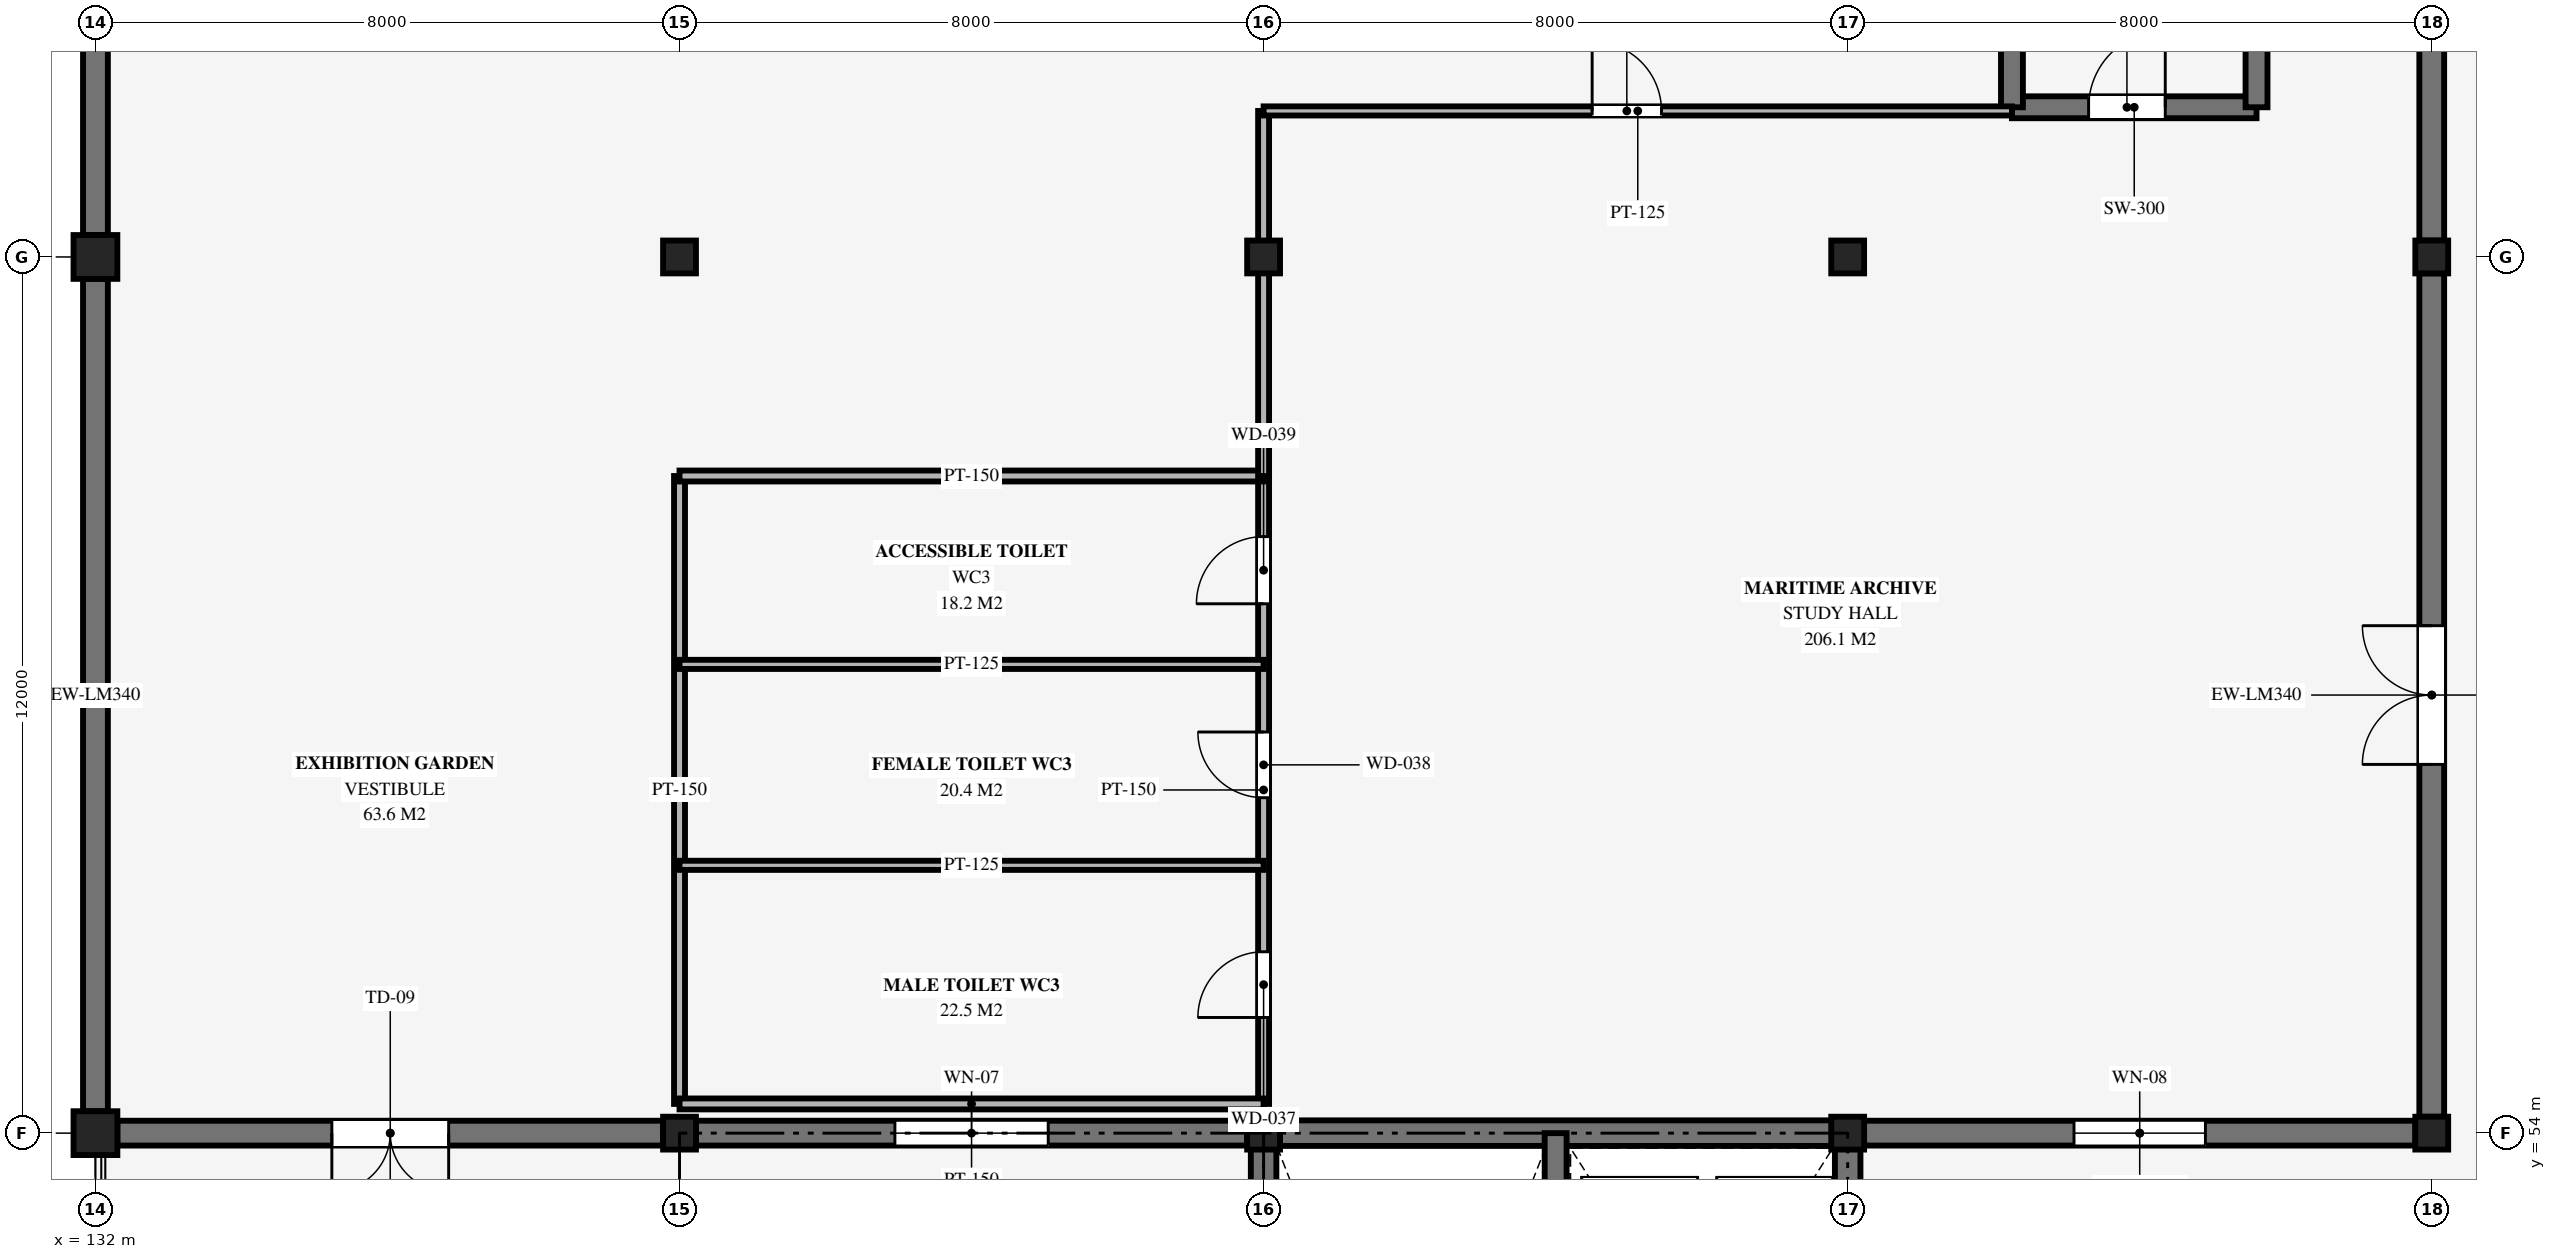
"""IFC4 building model, lengths in metres.
Left out: names, types, materials, properties, quantities, classifications, styles, units other than length and angle.
Written with IfcOpenShell. Run it as: python <this file> out.ifc"""

import sys

from ifc_helpers import new_model, si_unit, direction, frame, frame_2d, origin, origin_2d, place, context, subcontext, project, spatial, rectangle, circle, extrude, element, fill, save


model = new_model("IFC4")
c1 = context("Model", 3, precision=1e-05, world=origin(), true_north=direction((0.0, 1.0)))
c2 = subcontext(c1, "Body", "Model", "MODEL_VIEW")
j1 = project(units=[si_unit("LENGTHUNIT", "METRE"), si_unit("PLANEANGLEUNIT", "RADIAN")], contexts=[c1])
p1 = place(None, origin())
s1 = spatial("IfcSite", under=j1, at=p1, CompositionType="ELEMENT")
p2 = place(p1, origin())
s2 = spatial("IfcBuilding", under=s1, at=p2, CompositionType="ELEMENT")
p3 = place(p2, frame((0.0, 0.0, 15.0)))
s3 = spatial("IfcBuildingStorey", under=s2, at=p3, CompositionType="ELEMENT", Elevation=15.0)
for number, where, z_axis, x_axis in (
    (1, (132.0, 54.0, 0.0), (0.0, 0.0, 1.0), (1.0, 0.0, 0.0)),
    (2, (132.0, 66.0, 0.0), (0.0, 0.0, 1.0), (1.0, 0.0, 0.0)),
):
    element("IfcColumn", number, at=place(p3, frame(where, z_axis=z_axis, x_axis=x_axis)), inside=s3, PredefinedType="COLUMN", context=c2, shape_type="SweptSolid", body=[
        extrude(circle(Radius=0.3, at=origin_2d()), origin(), (0.0, 0.0, 1.0), 4.34),
    ])
for number, where, z_axis, x_axis in (
    (3, (140.0, 54.0, 0.0), (0.0, 0.0, 1.0), (1.0, 0.0, 0.0)),
    (4, (140.0, 66.0, 0.0), (0.0, 0.0, 1.0), (1.0, 0.0, 0.0)),
    (5, (148.0, 54.0, 0.0), (0.0, 0.0, 1.0), (1.0, 0.0, 0.0)),
    (6, (148.0, 66.0, 0.0), (0.0, 0.0, 1.0), (1.0, 0.0, 0.0)),
    (7, (156.0, 54.0, 0.0), (0.0, 0.0, 1.0), (1.0, 0.0, 0.0)),
    (8, (156.0, 66.0, 0.0), (0.0, 0.0, 1.0), (1.0, 0.0, 0.0)),
    (9, (164.0, 54.0, 0.0), (0.0, 0.0, 1.0), (1.0, 0.0, 0.0)),
    (10, (164.0, 66.0, 0.0), (0.0, 0.0, 1.0), (1.0, 0.0, 0.0)),
):
    element("IfcColumn", number, at=place(p3, frame(where, z_axis=z_axis, x_axis=x_axis)), inside=s3, PredefinedType="COLUMN", context=c2, shape_type="SweptSolid", body=[
        extrude(rectangle(XDim=0.45, YDim=0.45, at=origin_2d()), origin(), (0.0, 0.0, 1.0), 4.34),
    ])
p4 = place(p3, frame((132.0, 65.7, 0.0), z_axis=(0.0, 0.0, 1.0), x_axis=(0.0, -1.0, 0.0)))
e11 = element("IfcWall", 11, at=p4, inside=s3, PredefinedType="SOLIDWALL", context=c2, shape_type="SweptSolid", body=[
    extrude(rectangle(XDim=11.4, YDim=0.34, at=frame_2d((5.7, 0.0))), origin(), (0.0, 0.0, 1.0), 4.24),
])
p5 = place(p3, frame((164.0, 54.225, 0.0), z_axis=(0.0, 0.0, 1.0), x_axis=(0.0, 1.0, 0.0)))
e12 = element("IfcWall", 12, at=p5, inside=s3, PredefinedType="SOLIDWALL", context=c2, shape_type="SweptSolid", body=[
    extrude(rectangle(XDim=11.55, YDim=0.34, at=frame_2d((5.775, 0.0))), origin(), (0.0, 0.0, 1.0), 4.24),
])
p6 = place(p5, frame((4.825, 0.0, 0.0)))
e13 = element("IfcOpeningElement", 13, at=p6, cuts=e12, PredefinedType="OPENING", context=c2, shape_type="SweptSolid", body=[
    extrude(rectangle(XDim=1.9, YDim=2.2, at=frame_2d((0.95, 1.1))), frame((0.0, 0.18, 0.0), z_axis=(0.0, -1.0, 0.0), x_axis=(1.0, 0.0, 0.0)), (0.0, 0.0, 1.0), 0.36),
])
p7 = place(p3, frame((132.0, 77.7, 0.0), z_axis=(0.0, 0.0, 1.0), x_axis=(0.0, -1.0, 0.0)))
e14 = element("IfcWall", 14, at=p7, inside=s3, PredefinedType="SOLIDWALL", context=c2, shape_type="SweptSolid", body=[
    extrude(rectangle(XDim=11.4, YDim=0.34, at=frame_2d((5.7, 0.0))), origin(), (0.0, 0.0, 1.0), 4.24),
])
p8 = place(p7, frame((4.95, 0.0, 1.0)))
e15 = element("IfcOpeningElement", 15, at=p8, cuts=e14, PredefinedType="OPENING", context=c2, shape_type="SweptSolid", body=[
    extrude(rectangle(XDim=1.5, YDim=2.2, at=frame_2d((0.75, 1.1))), frame((0.0, 0.18, 0.0), z_axis=(0.0, -1.0, 0.0), x_axis=(1.0, 0.0, 0.0)), (0.0, 0.0, 1.0), 0.36),
])
p9 = place(p3, frame((164.0, 66.225, 0.0), z_axis=(0.0, 0.0, 1.0), x_axis=(0.0, 1.0, 0.0)))
e16 = element("IfcWall", 16, at=p9, inside=s3, PredefinedType="SOLIDWALL", context=c2, shape_type="SweptSolid", body=[
    extrude(rectangle(XDim=11.55, YDim=0.34, at=frame_2d((5.775, 0.0))), origin(), (0.0, 0.0, 1.0), 4.24),
])
p10 = place(p9, frame((5.175, 0.0, 1.0)))
e17 = element("IfcOpeningElement", 17, at=p10, cuts=e16, PredefinedType="OPENING", context=c2, shape_type="SweptSolid", body=[
    extrude(rectangle(XDim=1.2, YDim=2.2, at=frame_2d((0.6, 1.1))), frame((0.0, 0.18, 0.0), z_axis=(0.0, -1.0, 0.0), x_axis=(1.0, 0.0, 0.0)), (0.0, 0.0, 1.0), 0.36),
])
p11 = place(p3, frame((139.775, 54.0, 0.0), z_axis=(0.0, 0.0, 1.0), x_axis=(-1.0, 0.0, 0.0)))
e18 = element("IfcWall", 18, at=p11, inside=s3, PredefinedType="SOLIDWALL", context=c2, shape_type="SweptSolid", body=[
    extrude(rectangle(XDim=7.475, YDim=0.34, at=frame_2d((3.737, 0.0))), origin(), (0.0, 0.0, 1.0), 4.24),
])
p12 = place(p11, frame((2.937, 0.0, 0.0)))
e19 = element("IfcOpeningElement", 19, at=p12, cuts=e18, PredefinedType="OPENING", context=c2, shape_type="SweptSolid", body=[
    extrude(rectangle(XDim=1.6, YDim=2.2, at=frame_2d((0.8, 1.1))), frame((0.0, 0.18, 0.0), z_axis=(0.0, -1.0, 0.0), x_axis=(1.0, 0.0, 0.0)), (0.0, 0.0, 1.0), 0.36),
])
p13 = place(p3, frame((147.775, 54.0, 0.0), z_axis=(0.0, 0.0, 1.0), x_axis=(-1.0, 0.0, 0.0)))
e20 = element("IfcWall", 20, at=p13, inside=s3, PredefinedType="SOLIDWALL", context=c2, shape_type="SweptSolid", body=[
    extrude(rectangle(XDim=7.55, YDim=0.34, at=frame_2d((3.775, 0.0))), origin(), (0.0, 0.0, 1.0), 4.24),
])
p14 = place(p13, frame((2.725, 0.0, 1.0)))
e21 = element("IfcOpeningElement", 21, at=p14, cuts=e20, PredefinedType="OPENING", context=c2, shape_type="SweptSolid", body=[
    extrude(rectangle(XDim=2.1, YDim=1.8, at=frame_2d((1.05, 0.9))), frame((0.0, 0.18, 0.0), z_axis=(0.0, -1.0, 0.0), x_axis=(1.0, 0.0, 0.0)), (0.0, 0.0, 1.0), 0.36),
])
p15 = place(p3, frame((163.775, 54.0, 0.0), z_axis=(0.0, 0.0, 1.0), x_axis=(-1.0, 0.0, 0.0)))
e22 = element("IfcWall", 22, at=p15, inside=s3, PredefinedType="SOLIDWALL", context=c2, shape_type="SweptSolid", body=[
    extrude(rectangle(XDim=7.55, YDim=0.34, at=frame_2d((3.775, 0.0))), origin(), (0.0, 0.0, 1.0), 4.24),
])
p16 = place(p15, frame((2.875, 0.0, 1.0)))
e23 = element("IfcOpeningElement", 23, at=p16, cuts=e22, PredefinedType="OPENING", context=c2, shape_type="SweptSolid", body=[
    extrude(rectangle(XDim=1.8, YDim=1.8, at=frame_2d((0.9, 0.9))), frame((0.0, 0.18, 0.0), z_axis=(0.0, -1.0, 0.0), x_axis=(1.0, 0.0, 0.0)), (0.0, 0.0, 1.0), 0.36),
])
p17 = place(p3, frame((148.0, 54.0, 0.0), z_axis=(0.0, 0.0, 1.0), x_axis=(1.0, 0.0, 0.0)))
e24 = element("IfcWall", 24, at=p17, inside=s3, PredefinedType="SHEAR", context=c2, shape_type="SweptSolid", body=[
    extrude(rectangle(XDim=8.0, YDim=0.35, at=frame_2d((4.0, 0.0))), origin(), (0.0, 0.0, 1.0), 4.48),
])
p18 = place(p3, frame((148.0, 42.0, 0.0), z_axis=(0.0, 0.0, 1.0), x_axis=(0.0, 1.0, 0.0)))
e25 = element("IfcWall", 25, at=p18, inside=s3, PredefinedType="SHEAR", context=c2, shape_type="SweptSolid", body=[
    extrude(rectangle(XDim=12.0, YDim=0.35, at=frame_2d((6.0, 0.0))), origin(), (0.0, 0.0, 1.0), 4.48),
])
p19 = place(p3, frame((156.0, 42.0, 0.0), z_axis=(0.0, 0.0, 1.0), x_axis=(0.0, 1.0, 0.0)))
e26 = element("IfcWall", 26, at=p19, inside=s3, PredefinedType="SHEAR", context=c2, shape_type="SweptSolid", body=[
    extrude(rectangle(XDim=12.0, YDim=0.35, at=frame_2d((6.0, 0.0))), origin(), (0.0, 0.0, 1.0), 4.48),
])
p20 = place(p19, frame((1.4, 0.0, 0.0)))
e27 = element("IfcOpeningElement", 27, at=p20, cuts=e26, PredefinedType="OPENING", context=c2, shape_type="SweptSolid", body=[
    extrude(rectangle(XDim=1.5, YDim=2.2, at=frame_2d((0.75, 1.1))), frame((0.0, 0.185, 0.0), z_axis=(0.0, -1.0, 0.0), x_axis=(1.0, 0.0, 0.0)), (0.0, 0.0, 1.0), 0.37),
])
p21 = place(p3, frame((152.0, 54.0, 0.0), z_axis=(0.0, 0.0, 1.0), x_axis=(0.0, -1.0, 0.0)))
e28 = element("IfcWall", 28, at=p21, inside=s3, PredefinedType="SHEAR", context=c2, shape_type="SweptSolid", body=[
    extrude(rectangle(XDim=12.0, YDim=0.3, at=frame_2d((6.0, 0.0))), origin(), (0.0, 0.0, 1.0), 4.48),
])
p22 = place(p21, frame((10.45, 0.0, 0.0)))
e29 = element("IfcOpeningElement", 29, at=p22, cuts=e28, PredefinedType="OPENING", context=c2, shape_type="SweptSolid", body=[
    extrude(rectangle(XDim=1.05, YDim=2.15, at=frame_2d((0.525, 1.075))), frame((0.0, 0.16, 0.0), z_axis=(0.0, -1.0, 0.0), x_axis=(1.0, 0.0, 0.0)), (0.0, 0.0, 1.0), 0.32),
])
p23 = place(p3, frame((158.25, 68.05, 0.0), z_axis=(0.0, 0.0, 1.0), x_axis=(1.0, 0.0, 0.0)))
e30 = element("IfcWall", 30, at=p23, inside=s3, PredefinedType="SHEAR", context=c2, shape_type="SweptSolid", body=[
    extrude(rectangle(XDim=3.35, YDim=0.3, at=frame_2d((1.675, 0.0))), origin(), (0.0, 0.0, 1.0), 4.48),
])
p24 = place(p23, frame((1.05, 0.0, 0.0)))
e31 = element("IfcOpeningElement", 31, at=p24, cuts=e30, PredefinedType="OPENING", context=c2, shape_type="SweptSolid", body=[
    extrude(rectangle(XDim=1.05, YDim=2.15, at=frame_2d((0.525, 1.075))), frame((0.0, 0.16, 0.0), z_axis=(0.0, -1.0, 0.0), x_axis=(1.0, 0.0, 0.0)), (0.0, 0.0, 1.0), 0.32),
])
for number, where, z_axis, x_axis in (
    (32, (158.25, 68.05, 0.0), (0.0, 0.0, 1.0), (0.0, 1.0, 0.0)),
    (33, (161.6, 68.05, 0.0), (0.0, 0.0, 1.0), (0.0, 1.0, 0.0)),
):
    element("IfcWall", number, at=place(p3, frame(where, z_axis=z_axis, x_axis=x_axis)), inside=s3, PredefinedType="SHEAR", context=c2, shape_type="SweptSolid", body=[
        extrude(rectangle(XDim=9.0, YDim=0.3, at=frame_2d((4.5, 0.0))), origin(), (0.0, 0.0, 1.0), 4.48),
    ])
p25 = place(p3, frame((140.0, 54.4, 0.0), z_axis=(0.0, 0.0, 1.0), x_axis=(0.0, 1.0, 0.0)))
e34 = element("IfcWall", 34, at=p25, inside=s3, PredefinedType="PARTITIONING", context=c2, shape_type="SweptSolid", body=[
    extrude(rectangle(XDim=8.6, YDim=0.15, at=frame_2d((4.3, 0.0))), origin(), (0.0, 0.0, 1.0), 3.45),
])
p26 = place(p3, frame((148.0, 54.4, 0.0), z_axis=(0.0, 0.0, 1.0), x_axis=(0.0, 1.0, 0.0)))
e35 = element("IfcWall", 35, at=p26, inside=s3, PredefinedType="PARTITIONING", context=c2, shape_type="SweptSolid", body=[
    extrude(rectangle(XDim=8.6, YDim=0.15, at=frame_2d((4.3, 0.0))), origin(), (0.0, 0.0, 1.0), 3.45),
])
p27 = place(p26, frame((1.184, 0.0, 0.0)))
e36 = element("IfcOpeningElement", 36, at=p27, cuts=e35, PredefinedType="OPENING", context=c2, shape_type="SweptSolid", body=[
    extrude(rectangle(XDim=0.9, YDim=2.1, at=frame_2d((0.45, 1.05))), frame((0.0, 0.085, 0.0), z_axis=(0.0, -1.0, 0.0), x_axis=(1.0, 0.0, 0.0)), (0.0, 0.0, 1.0), 0.17),
])
p28 = place(p26, frame((4.194, 0.0, 0.0)))
e37 = element("IfcOpeningElement", 37, at=p28, cuts=e35, PredefinedType="OPENING", context=c2, shape_type="SweptSolid", body=[
    extrude(rectangle(XDim=0.9, YDim=2.1, at=frame_2d((0.45, 1.05))), frame((0.0, 0.085, 0.0), z_axis=(0.0, -1.0, 0.0), x_axis=(1.0, 0.0, 0.0)), (0.0, 0.0, 1.0), 0.17),
])
p29 = place(p26, frame((6.85, 0.0, 0.0)))
e38 = element("IfcOpeningElement", 38, at=p29, cuts=e35, PredefinedType="OPENING", context=c2, shape_type="SweptSolid", body=[
    extrude(rectangle(XDim=0.92, YDim=2.1, at=frame_2d((0.46, 1.05))), frame((0.0, 0.085, 0.0), z_axis=(0.0, -1.0, 0.0), x_axis=(1.0, 0.0, 0.0)), (0.0, 0.0, 1.0), 0.17),
])
for number, where, z_axis, x_axis in (
    (39, (140.0, 63.0, 0.0), (0.0, 0.0, 1.0), (1.0, 0.0, 0.0)),
    (40, (140.0, 54.4, 0.0), (0.0, 0.0, 1.0), (1.0, 0.0, 0.0)),
):
    element("IfcWall", number, at=place(p3, frame(where, z_axis=z_axis, x_axis=x_axis)), inside=s3, PredefinedType="PARTITIONING", context=c2, shape_type="SweptSolid", body=[
        extrude(rectangle(XDim=8.0, YDim=0.15, at=frame_2d((4.0, 0.0))), origin(), (0.0, 0.0, 1.0), 3.45),
    ])
for number, where, z_axis, x_axis in (
    (41, (140.0, 57.668, 0.0), (0.0, 0.0, 1.0), (1.0, 0.0, 0.0)),
    (42, (140.0, 60.42, 0.0), (0.0, 0.0, 1.0), (1.0, 0.0, 0.0)),
):
    element("IfcWall", number, at=place(p3, frame(where, z_axis=z_axis, x_axis=x_axis)), inside=s3, PredefinedType="PARTITIONING", context=c2, shape_type="SweptSolid", body=[
        extrude(rectangle(XDim=8.0, YDim=0.125, at=frame_2d((4.0, 0.0))), origin(), (0.0, 0.0, 1.0), 3.45),
    ])
p30 = place(p3, frame((148.0, 63.0, 0.0), z_axis=(0.0, 0.0, 1.0), x_axis=(0.0, 1.0, 0.0)))
e43 = element("IfcWall", 43, at=p30, inside=s3, PredefinedType="PARTITIONING", context=c2, shape_type="SweptSolid", body=[
    extrude(rectangle(XDim=5.0, YDim=0.15, at=frame_2d((2.5, 0.0))), origin(), (0.0, 0.0, 1.0), 3.45),
])
p31 = place(p3, frame((148.0, 68.0, 0.0), z_axis=(0.0, 0.0, 1.0), x_axis=(1.0, 0.0, 0.0)))
e44 = element("IfcWall", 44, at=p31, inside=s3, PredefinedType="PARTITIONING", context=c2, shape_type="SweptSolid", body=[
    extrude(rectangle(XDim=10.25, YDim=0.125, at=frame_2d((5.125, 0.0))), origin(), (0.0, 0.0, 1.0), 3.45),
])
p32 = place(p31, frame((4.5, 0.0, 0.0)))
e45 = element("IfcOpeningElement", 45, at=p32, cuts=e44, PredefinedType="OPENING", context=c2, shape_type="SweptSolid", body=[
    extrude(rectangle(XDim=0.95, YDim=2.1, at=frame_2d((0.475, 1.05))), frame((0.0, 0.073, 0.0), z_axis=(0.0, -1.0, 0.0), x_axis=(1.0, 0.0, 0.0)), (0.0, 0.0, 1.0), 0.145),
])
p33 = place(p6, origin())
e46 = element("IfcDoor", 46, at=p33, inside=s3, OperationType="DOUBLE_DOOR_SINGLE_SWING", PredefinedType="DOOR", context=c2, shape_type="SweptSolid", body=[
    extrude(rectangle(XDim=1.9, YDim=2.2, at=frame_2d((0.95, 1.1))), frame((0.0, 0.025, 0.0), z_axis=(0.0, -1.0, 0.0), x_axis=(1.0, 0.0, 0.0)), (0.0, 0.0, 1.0), 0.05),
])
fill(e13, e46)
p34 = place(p12, origin())
e47 = element("IfcDoor", 47, at=p34, inside=s3, OperationType="DOUBLE_DOOR_SINGLE_SWING", PredefinedType="DOOR", context=c2, shape_type="SweptSolid", body=[
    extrude(rectangle(XDim=1.6, YDim=2.2, at=frame_2d((0.8, 1.1))), frame((0.0, 0.025, 0.0), z_axis=(0.0, -1.0, 0.0), x_axis=(1.0, 0.0, 0.0)), (0.0, 0.0, 1.0), 0.05),
])
fill(e19, e47)
p35 = place(p14, origin())
e48 = element("IfcWindow", 48, at=p35, inside=s3, PartitioningType="SINGLE_PANEL", PredefinedType="WINDOW", context=c2, shape_type="SweptSolid", body=[
    extrude(rectangle(XDim=2.1, YDim=1.8, at=frame_2d((1.05, 0.9))), frame((0.0, 0.03, 0.0), z_axis=(0.0, -1.0, 0.0), x_axis=(1.0, 0.0, 0.0)), (0.0, 0.0, 1.0), 0.06),
])
fill(e21, e48)
p36 = place(p16, origin())
e49 = element("IfcWindow", 49, at=p36, inside=s3, PartitioningType="SINGLE_PANEL", PredefinedType="WINDOW", context=c2, shape_type="SweptSolid", body=[
    extrude(rectangle(XDim=1.8, YDim=1.8, at=frame_2d((0.9, 0.9))), frame((0.0, 0.03, 0.0), z_axis=(0.0, -1.0, 0.0), x_axis=(1.0, 0.0, 0.0)), (0.0, 0.0, 1.0), 0.06),
])
fill(e23, e49)
p37 = place(p24, origin())
e50 = element("IfcDoor", 50, at=p37, inside=s3, OperationType="SINGLE_SWING_RIGHT", PredefinedType="DOOR", context=c2, shape_type="SweptSolid", body=[
    extrude(rectangle(XDim=1.05, YDim=2.15, at=frame_2d((0.525, 1.075))), frame((0.0, 0.025, 0.0), z_axis=(0.0, -1.0, 0.0), x_axis=(1.0, 0.0, 0.0)), (0.0, 0.0, 1.0), 0.05),
])
fill(e31, e50)
p38 = place(p27, origin())
e51 = element("IfcDoor", 51, at=p38, inside=s3, OperationType="SINGLE_SWING_LEFT", PredefinedType="DOOR", context=c2, shape_type="SweptSolid", body=[
    extrude(rectangle(XDim=0.9, YDim=2.1, at=frame_2d((0.45, 1.05))), frame((0.0, 0.025, 0.0), z_axis=(0.0, -1.0, 0.0), x_axis=(1.0, 0.0, 0.0)), (0.0, 0.0, 1.0), 0.05),
])
fill(e36, e51)
p39 = place(p28, origin())
e52 = element("IfcDoor", 52, at=p39, inside=s3, OperationType="SINGLE_SWING_RIGHT", PredefinedType="DOOR", context=c2, shape_type="SweptSolid", body=[
    extrude(rectangle(XDim=0.9, YDim=2.1, at=frame_2d((0.45, 1.05))), frame((0.0, 0.025, 0.0), z_axis=(0.0, -1.0, 0.0), x_axis=(1.0, 0.0, 0.0)), (0.0, 0.0, 1.0), 0.05),
])
fill(e37, e52)
p40 = place(p29, origin())
e53 = element("IfcDoor", 53, at=p40, inside=s3, OperationType="SINGLE_SWING_LEFT", PredefinedType="DOOR", context=c2, shape_type="SweptSolid", body=[
    extrude(rectangle(XDim=0.92, YDim=2.1, at=frame_2d((0.46, 1.05))), frame((0.0, 0.025, 0.0), z_axis=(0.0, -1.0, 0.0), x_axis=(1.0, 0.0, 0.0)), (0.0, 0.0, 1.0), 0.05),
])
fill(e38, e53)
p41 = place(p32, origin())
e54 = element("IfcDoor", 54, at=p41, inside=s3, OperationType="SINGLE_SWING_LEFT", PredefinedType="DOOR", context=c2, shape_type="SweptSolid", body=[
    extrude(rectangle(XDim=0.95, YDim=2.1, at=frame_2d((0.475, 1.05))), frame((0.0, 0.025, 0.0), z_axis=(0.0, -1.0, 0.0), x_axis=(1.0, 0.0, 0.0)), (0.0, 0.0, 1.0), 0.05),
])
fill(e45, e54)
save(model, sys.argv[1])
